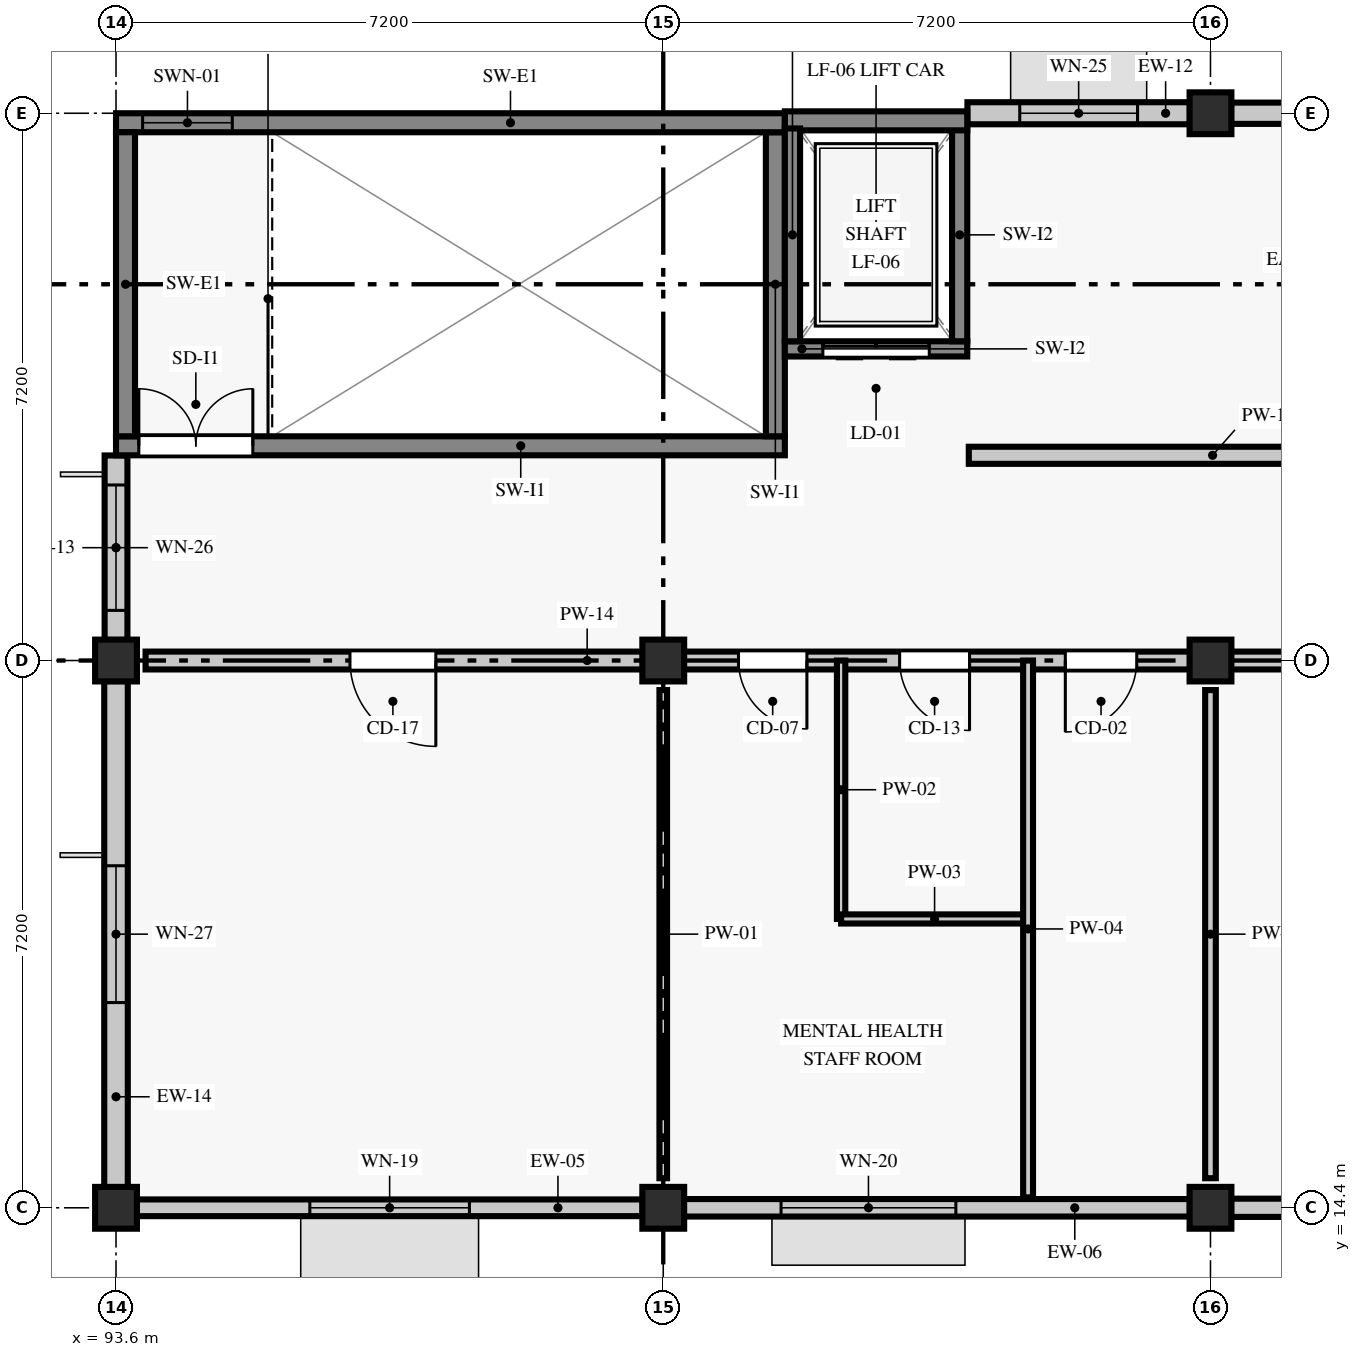
"""IFC4 building model, lengths in metres.
Left out: names, types, materials, properties, quantities, classifications, styles, units other than length and angle.
Written with IfcOpenShell. Run it as: python <this file> out.ifc"""

import sys

from ifc_helpers import new_model, si_unit, direction, frame, frame_2d, origin, origin_2d, place, context, subcontext, project, spatial, rectangle, extrude, element, fill, save


model = new_model("IFC4")
c1 = context("Model", 3, precision=1e-05, world=origin(), true_north=direction((0.0, 1.0)))
c2 = subcontext(c1, "Body", "Model", "MODEL_VIEW")
j1 = project(units=[si_unit("LENGTHUNIT", "METRE"), si_unit("PLANEANGLEUNIT", "RADIAN")], contexts=[c1])
p1 = place(None, origin())
s1 = spatial("IfcSite", under=j1, at=p1, CompositionType="ELEMENT")
p2 = place(p1, origin())
s2 = spatial("IfcBuilding", under=s1, at=p2, CompositionType="ELEMENT")
p3 = place(p2, frame((0.0, 0.0, 18.0)))
s3 = spatial("IfcBuildingStorey", under=s2, at=p3, CompositionType="ELEMENT", Elevation=18.0)
for number, where, z_axis, x_axis in (
    (1, (93.6, 14.4, 0.0), (0.0, 0.0, 1.0), (1.0, 0.0, 0.0)),
    (2, (93.6, 21.6, 0.0), (0.0, 0.0, 1.0), (1.0, 0.0, 0.0)),
    (3, (100.8, 14.4, 0.0), (0.0, 0.0, 1.0), (1.0, 0.0, 0.0)),
    (4, (100.8, 21.6, 0.0), (0.0, 0.0, 1.0), (1.0, 0.0, 0.0)),
    (5, (108.0, 14.4, 0.0), (0.0, 0.0, 1.0), (1.0, 0.0, 0.0)),
    (6, (108.0, 21.6, 0.0), (0.0, 0.0, 1.0), (1.0, 0.0, 0.0)),
    (7, (108.0, 28.8, 0.0), (0.0, 0.0, 1.0), (1.0, 0.0, 0.0)),
):
    element("IfcColumn", number, at=place(p3, frame(where, z_axis=z_axis, x_axis=x_axis)), inside=s3, PredefinedType="COLUMN", context=c2, shape_type="SweptSolid", body=[
        extrude(rectangle(XDim=0.55, YDim=0.55, at=origin_2d()), origin(), (0.0, 0.0, 1.0), 4.2),
    ])
p4 = place(p3, frame((93.871, 14.4, 0.0), z_axis=(0.0, 0.0, 1.0), x_axis=(1.0, 0.0, 0.0)))
e8 = element("IfcWall", 8, at=p4, inside=s3, PredefinedType="STANDARD", context=c2, shape_type="SweptSolid", body=[
    extrude(rectangle(XDim=6.658, YDim=0.22, at=frame_2d((3.329, 0.0))), origin(), (0.0, 0.0, 1.0), 3.55),
])
p5 = place(p4, frame((2.279, 0.0, 0.9)))
e9 = element("IfcOpeningElement", 9, at=p5, cuts=e8, PredefinedType="OPENING", context=c2, shape_type="SweptSolid", body=[
    extrude(rectangle(XDim=2.1, YDim=1.42, at=frame_2d((1.05, 0.71))), frame((0.0, 0.12, 0.0), z_axis=(0.0, -1.0, 0.0), x_axis=(1.0, 0.0, 0.0)), (0.0, 0.0, 1.0), 0.24),
])
p6 = place(p3, frame((101.071, 14.4, 0.0), z_axis=(0.0, 0.0, 1.0), x_axis=(1.0, 0.0, 0.0)))
e10 = element("IfcWall", 10, at=p6, inside=s3, PredefinedType="STANDARD", context=c2, shape_type="SweptSolid", body=[
    extrude(rectangle(XDim=6.658, YDim=0.23, at=frame_2d((3.329, 0.0))), origin(), (0.0, 0.0, 1.0), 3.55),
])
p7 = place(p6, frame((1.279, 0.0, 0.9)))
e11 = element("IfcOpeningElement", 11, at=p7, cuts=e10, PredefinedType="OPENING", context=c2, shape_type="SweptSolid", body=[
    extrude(rectangle(XDim=2.3, YDim=1.42, at=frame_2d((1.15, 0.71))), frame((0.0, 0.125, 0.0), z_axis=(0.0, -1.0, 0.0), x_axis=(1.0, 0.0, 0.0)), (0.0, 0.0, 1.0), 0.25),
])
p8 = place(p3, frame((108.271, 14.4, 0.0), z_axis=(0.0, 0.0, 1.0), x_axis=(1.0, 0.0, 0.0)))
e12 = element("IfcWall", 12, at=p8, inside=s3, PredefinedType="STANDARD", context=c2, shape_type="SweptSolid", body=[
    extrude(rectangle(XDim=6.658, YDim=0.24, at=frame_2d((3.329, 0.0))), origin(), (0.0, 0.0, 1.0), 3.55),
])
p9 = place(p8, frame((2.754, 0.0, 0.9)))
e13 = element("IfcOpeningElement", 13, at=p9, cuts=e12, PredefinedType="OPENING", context=c2, shape_type="SweptSolid", body=[
    extrude(rectangle(XDim=1.15, YDim=1.54, at=frame_2d((0.575, 0.77))), frame((0.0, 0.13, 0.0), z_axis=(0.0, -1.0, 0.0), x_axis=(1.0, 0.0, 0.0)), (0.0, 0.0, 1.0), 0.26),
])
p10 = place(p3, frame((113.598, 28.8, 0.0), z_axis=(0.0, 0.0, 1.0), x_axis=(-1.0, 0.0, 0.0)))
e14 = element("IfcWall", 14, at=p10, inside=s3, PredefinedType="STANDARD", context=c2, shape_type="SweptSolid", body=[
    extrude(rectangle(XDim=5.327, YDim=0.28, at=frame_2d((2.664, 0.0))), origin(), (0.0, 0.0, 1.0), 4.2),
])
p11 = place(p10, frame((1.938, 0.0, 0.9)))
e15 = element("IfcOpeningElement", 15, at=p11, cuts=e14, PredefinedType="OPENING", context=c2, shape_type="SweptSolid", body=[
    extrude(rectangle(XDim=1.45, YDim=1.54, at=frame_2d((0.725, 0.77))), frame((0.0, 0.15, 0.0), z_axis=(0.0, -1.0, 0.0), x_axis=(1.0, 0.0, 0.0)), (0.0, 0.0, 1.0), 0.3),
])
p12 = place(p3, frame((107.729, 28.8, 0.0), z_axis=(0.0, 0.0, 1.0), x_axis=(-1.0, 0.0, 0.0)))
e16 = element("IfcWall", 16, at=p12, inside=s3, PredefinedType="STANDARD", context=c2, shape_type="SweptSolid", body=[
    extrude(rectangle(XDim=2.927, YDim=0.29, at=frame_2d((1.463, 0.0))), origin(), (0.0, 0.0, 1.0), 4.2),
])
p13 = place(p12, frame((0.688, 0.0, 0.9)))
e17 = element("IfcOpeningElement", 17, at=p13, cuts=e16, PredefinedType="OPENING", context=c2, shape_type="SweptSolid", body=[
    extrude(rectangle(XDim=1.55, YDim=1.54, at=frame_2d((0.775, 0.77))), frame((0.0, 0.155, 0.0), z_axis=(0.0, -1.0, 0.0), x_axis=(1.0, 0.0, 0.0)), (0.0, 0.0, 1.0), 0.31),
])
p14 = place(p3, frame((93.6, 24.298, 0.0), z_axis=(0.0, 0.0, 1.0), x_axis=(0.0, -1.0, 0.0)))
e18 = element("IfcWall", 18, at=p14, inside=s3, PredefinedType="STANDARD", context=c2, shape_type="SweptSolid", body=[
    extrude(rectangle(XDim=2.427, YDim=0.3, at=frame_2d((1.213, 0.0))), origin(), (0.0, 0.0, 1.0), 4.2),
])
p15 = place(p14, frame((0.388, 0.0, 0.9)))
e19 = element("IfcOpeningElement", 19, at=p15, cuts=e18, PredefinedType="OPENING", context=c2, shape_type="SweptSolid", body=[
    extrude(rectangle(XDim=1.65, YDim=1.54, at=frame_2d((0.825, 0.77))), frame((0.0, 0.16, 0.0), z_axis=(0.0, -1.0, 0.0), x_axis=(1.0, 0.0, 0.0)), (0.0, 0.0, 1.0), 0.32),
])
p16 = place(p3, frame((93.6, 21.329, 0.0), z_axis=(0.0, 0.0, 1.0), x_axis=(0.0, -1.0, 0.0)))
e20 = element("IfcWall", 20, at=p16, inside=s3, PredefinedType="STANDARD", context=c2, shape_type="SweptSolid", body=[
    extrude(rectangle(XDim=6.658, YDim=0.31, at=frame_2d((3.329, 0.0))), origin(), (0.0, 0.0, 1.0), 3.55),
])
p17 = place(p16, frame((2.429, 0.0, 0.9)))
e21 = element("IfcOpeningElement", 21, at=p17, cuts=e20, PredefinedType="OPENING", context=c2, shape_type="SweptSolid", body=[
    extrude(rectangle(XDim=1.8, YDim=1.54, at=frame_2d((0.9, 0.77))), frame((0.0, 0.165, 0.0), z_axis=(0.0, -1.0, 0.0), x_axis=(1.0, 0.0, 0.0)), (0.0, 0.0, 1.0), 0.33),
])
p18 = place(p3, frame((93.6, 24.425, 0.0), z_axis=(0.0, 0.0, 1.0), x_axis=(1.0, 0.0, 0.0)))
e22 = element("IfcWall", 22, at=p18, inside=s3, PredefinedType="SHEAR", context=c2, shape_type="SweptSolid", body=[
    extrude(rectangle(XDim=8.8, YDim=0.25, at=frame_2d((4.4, 0.0))), origin(), (0.0, 0.0, 1.0), 4.2),
])
p19 = place(p18, frame((0.3, 0.0, 0.0)))
e23 = element("IfcOpeningElement", 23, at=p19, cuts=e22, PredefinedType="OPENING", context=c2, shape_type="SweptSolid", body=[
    extrude(rectangle(XDim=1.5, YDim=2.15, at=frame_2d((0.75, 1.075))), frame((0.0, 0.135, 0.0), z_axis=(0.0, -1.0, 0.0), x_axis=(1.0, 0.0, 0.0)), (0.0, 0.0, 1.0), 0.27),
])
p20 = place(p3, frame((102.275, 24.55, 0.0), z_axis=(0.0, 0.0, 1.0), x_axis=(0.0, 1.0, 0.0)))
e24 = element("IfcWall", 24, at=p20, inside=s3, PredefinedType="SHEAR", context=c2, shape_type="SweptSolid", body=[
    extrude(rectangle(XDim=4.0, YDim=0.25, at=frame_2d((2.0, 0.0))), origin(), (0.0, 0.0, 1.0), 4.2),
])
p21 = place(p3, frame((102.4, 28.675, 0.0), z_axis=(0.0, 0.0, 1.0), x_axis=(-1.0, 0.0, 0.0)))
e25 = element("IfcWall", 25, at=p21, inside=s3, PredefinedType="SHEAR", context=c2, shape_type="SweptSolid", body=[
    extrude(rectangle(XDim=8.8, YDim=0.25, at=frame_2d((4.4, 0.0))), origin(), (0.0, 0.0, 1.0), 4.2),
])
p22 = place(p21, frame((7.27, 0.0, 0.92)))
e26 = element("IfcOpeningElement", 26, at=p22, cuts=e25, PredefinedType="OPENING", context=c2, shape_type="SweptSolid", body=[
    extrude(rectangle(XDim=1.18, YDim=1.48, at=frame_2d((0.59, 0.74))), frame((0.0, 0.135, 0.0), z_axis=(0.0, -1.0, 0.0), x_axis=(1.0, 0.0, 0.0)), (0.0, 0.0, 1.0), 0.27),
])
p23 = place(p3, frame((93.725, 28.55, 0.0), z_axis=(0.0, 0.0, 1.0), x_axis=(0.0, -1.0, 0.0)))
e27 = element("IfcWall", 27, at=p23, inside=s3, PredefinedType="SHEAR", context=c2, shape_type="SweptSolid", body=[
    extrude(rectangle(XDim=4.0, YDim=0.25, at=frame_2d((2.0, 0.0))), origin(), (0.0, 0.0, 1.0), 4.2),
])
p24 = place(p3, frame((102.4, 25.7, 0.0), z_axis=(0.0, 0.0, 1.0), x_axis=(1.0, 0.0, 0.0)))
e28 = element("IfcWall", 28, at=p24, inside=s3, PredefinedType="SHEAR", context=c2, shape_type="SweptSolid", body=[
    extrude(rectangle(XDim=2.4, YDim=0.2, at=frame_2d((1.2, 0.0))), origin(), (0.0, 0.0, 1.0), 4.2),
])
p25 = place(p24, frame((0.5, 0.0, 0.0)))
e29 = element("IfcOpeningElement", 29, at=p25, cuts=e28, PredefinedType="OPENING", context=c2, shape_type="SweptSolid", body=[
    extrude(rectangle(XDim=1.4, YDim=2.15, at=frame_2d((0.7, 1.075))), frame((0.0, 0.11, 0.0), z_axis=(0.0, -1.0, 0.0), x_axis=(1.0, 0.0, 0.0)), (0.0, 0.0, 1.0), 0.22),
])
p26 = place(p3, frame((104.7, 25.8, 0.0), z_axis=(0.0, 0.0, 1.0), x_axis=(0.0, 1.0, 0.0)))
e30 = element("IfcWall", 30, at=p26, inside=s3, PredefinedType="SHEAR", context=c2, shape_type="SweptSolid", body=[
    extrude(rectangle(XDim=2.8, YDim=0.2, at=frame_2d((1.4, 0.0))), origin(), (0.0, 0.0, 1.0), 4.2),
])
p27 = place(p3, frame((104.8, 28.7, 0.0), z_axis=(0.0, 0.0, 1.0), x_axis=(-1.0, 0.0, 0.0)))
e31 = element("IfcWall", 31, at=p27, inside=s3, PredefinedType="SHEAR", context=c2, shape_type="SweptSolid", body=[
    extrude(rectangle(XDim=2.4, YDim=0.25, at=frame_2d((1.2, 0.0))), origin(), (0.0, 0.0, 1.0), 4.2),
])
p28 = place(p3, frame((102.5, 28.6, 0.0), z_axis=(0.0, 0.0, 1.0), x_axis=(0.0, -1.0, 0.0)))
e32 = element("IfcWall", 32, at=p28, inside=s3, PredefinedType="SHEAR", context=c2, shape_type="SweptSolid", body=[
    extrude(rectangle(XDim=2.8, YDim=0.2, at=frame_2d((1.4, 0.0))), origin(), (0.0, 0.0, 1.0), 4.2),
])
p29 = place(p3, frame((93.989, 21.6, 0.0), z_axis=(0.0, 0.0, 1.0), x_axis=(1.0, 0.0, 0.0)))
e33 = element("IfcWall", 33, at=p29, inside=s3, PredefinedType="PARTITIONING", context=c2, shape_type="SweptSolid", body=[
    extrude(rectangle(XDim=20.822, YDim=0.235, at=frame_2d((10.411, 0.0))), origin(), (0.0, 0.0, 1.0), 3.5),
])
p30 = place(p29, frame((2.689, 0.0, 0.0)))
e34 = element("IfcOpeningElement", 34, at=p30, cuts=e33, PredefinedType="OPENING", context=c2, shape_type="SweptSolid", body=[
    extrude(rectangle(XDim=1.13, YDim=2.18, at=frame_2d((0.565, 1.09))), frame((0.0, 0.127, 0.0), z_axis=(0.0, -1.0, 0.0), x_axis=(1.0, 0.0, 0.0)), (0.0, 0.0, 1.0), 0.255),
])
p31 = place(p29, frame((7.801, 0.0, 0.0)))
e35 = element("IfcOpeningElement", 35, at=p31, cuts=e33, PredefinedType="OPENING", context=c2, shape_type="SweptSolid", body=[
    extrude(rectangle(XDim=0.9, YDim=2.13, at=frame_2d((0.45, 1.065))), frame((0.0, 0.127, 0.0), z_axis=(0.0, -1.0, 0.0), x_axis=(1.0, 0.0, 0.0)), (0.0, 0.0, 1.0), 0.255),
])
p32 = place(p29, frame((9.921, 0.0, 0.0)))
e36 = element("IfcOpeningElement", 36, at=p32, cuts=e33, PredefinedType="OPENING", context=c2, shape_type="SweptSolid", body=[
    extrude(rectangle(XDim=0.92, YDim=2.18, at=frame_2d((0.46, 1.09))), frame((0.0, 0.127, 0.0), z_axis=(0.0, -1.0, 0.0), x_axis=(1.0, 0.0, 0.0)), (0.0, 0.0, 1.0), 0.255),
])
p33 = place(p29, frame((12.101, 0.0, 0.0)))
e37 = element("IfcOpeningElement", 37, at=p33, cuts=e33, PredefinedType="OPENING", context=c2, shape_type="SweptSolid", body=[
    extrude(rectangle(XDim=0.94, YDim=2.08, at=frame_2d((0.47, 1.04))), frame((0.0, 0.127, 0.0), z_axis=(0.0, -1.0, 0.0), x_axis=(1.0, 0.0, 0.0)), (0.0, 0.0, 1.0), 0.255),
])
p34 = place(p29, frame((17.009, 0.0, 0.0)))
e38 = element("IfcOpeningElement", 38, at=p34, cuts=e33, PredefinedType="OPENING", context=c2, shape_type="SweptSolid", body=[
    extrude(rectangle(XDim=1.12, YDim=2.23, at=frame_2d((0.56, 1.115))), frame((0.0, 0.127, 0.0), z_axis=(0.0, -1.0, 0.0), x_axis=(1.0, 0.0, 0.0)), (0.0, 0.0, 1.0), 0.255),
])
p35 = place(p3, frame((100.8, 14.789, 0.0), z_axis=(0.0, 0.0, 1.0), x_axis=(0.0, 1.0, 0.0)))
e39 = element("IfcWall", 39, at=p35, inside=s3, PredefinedType="PARTITIONING", context=c2, shape_type="SweptSolid", body=[
    extrude(rectangle(XDim=6.422, YDim=0.1, at=frame_2d((3.211, 0.0))), origin(), (0.0, 0.0, 1.0), 3.65),
])
p36 = place(p3, frame((103.14, 18.2, 0.0), z_axis=(0.0, 0.0, 1.0), x_axis=(0.0, 1.0, 0.0)))
e40 = element("IfcWall", 40, at=p36, inside=s3, PredefinedType="PARTITIONING", context=c2, shape_type="SweptSolid", body=[
    extrude(rectangle(XDim=3.4, YDim=0.11, at=frame_2d((1.7, 0.0))), origin(), (0.0, 0.0, 1.0), 3.5),
])
p37 = place(p3, frame((103.14, 18.2, 0.0), z_axis=(0.0, 0.0, 1.0), x_axis=(1.0, 0.0, 0.0)))
e41 = element("IfcWall", 41, at=p37, inside=s3, PredefinedType="PARTITIONING", context=c2, shape_type="SweptSolid", body=[
    extrude(rectangle(XDim=2.46, YDim=0.12, at=frame_2d((1.23, 0.0))), origin(), (0.0, 0.0, 1.0), 4.2),
])
p38 = place(p3, frame((105.6, 14.537, 0.0), z_axis=(0.0, 0.0, 1.0), x_axis=(0.0, 1.0, 0.0)))
e42 = element("IfcWall", 42, at=p38, inside=s3, PredefinedType="PARTITIONING", context=c2, shape_type="SweptSolid", body=[
    extrude(rectangle(XDim=7.063, YDim=0.13, at=frame_2d((3.531, 0.0))), origin(), (0.0, 0.0, 1.0), 3.5),
])
p39 = place(p3, frame((108.0, 14.789, 0.0), z_axis=(0.0, 0.0, 1.0), x_axis=(0.0, 1.0, 0.0)))
e43 = element("IfcWall", 43, at=p39, inside=s3, PredefinedType="PARTITIONING", context=c2, shape_type="SweptSolid", body=[
    extrude(rectangle(XDim=6.422, YDim=0.14, at=frame_2d((3.211, 0.0))), origin(), (0.0, 0.0, 1.0), 3.65),
])
p40 = place(p3, frame((104.82, 24.3, 0.0), z_axis=(0.0, 0.0, 1.0), x_axis=(1.0, 0.0, 0.0)))
e44 = element("IfcWall", 44, at=p40, inside=s3, PredefinedType="PARTITIONING", context=c2, shape_type="SweptSolid", body=[
    extrude(rectangle(XDim=8.76, YDim=0.225, at=frame_2d((4.38, 0.0))), origin(), (0.0, 0.0, 1.0), 3.65),
])
p41 = place(p40, frame((6.465, 0.0, 0.0)))
e45 = element("IfcOpeningElement", 45, at=p41, cuts=e44, PredefinedType="OPENING", context=c2, shape_type="SweptSolid", body=[
    extrude(rectangle(XDim=1.2, YDim=2.23, at=frame_2d((0.6, 1.115))), frame((0.0, 0.123, 0.0), z_axis=(0.0, -1.0, 0.0), x_axis=(1.0, 0.0, 0.0)), (0.0, 0.0, 1.0), 0.245),
])
p42 = place(p5, origin())
e46 = element("IfcWindow", 46, at=p42, inside=s3, PartitioningType="SINGLE_PANEL", PredefinedType="WINDOW", context=c2, shape_type="SweptSolid", body=[
    extrude(rectangle(XDim=2.1, YDim=1.42, at=frame_2d((1.05, 0.71))), frame((0.0, 0.03, 0.0), z_axis=(0.0, -1.0, 0.0), x_axis=(1.0, 0.0, 0.0)), (0.0, 0.0, 1.0), 0.06),
])
fill(e9, e46)
p43 = place(p7, origin())
e47 = element("IfcWindow", 47, at=p43, inside=s3, PartitioningType="SINGLE_PANEL", PredefinedType="WINDOW", context=c2, shape_type="SweptSolid", body=[
    extrude(rectangle(XDim=2.3, YDim=1.42, at=frame_2d((1.15, 0.71))), frame((0.0, 0.03, 0.0), z_axis=(0.0, -1.0, 0.0), x_axis=(1.0, 0.0, 0.0)), (0.0, 0.0, 1.0), 0.06),
])
fill(e11, e47)
p44 = place(p13, origin())
e48 = element("IfcWindow", 48, at=p44, inside=s3, PartitioningType="SINGLE_PANEL", PredefinedType="WINDOW", context=c2, shape_type="SweptSolid", body=[
    extrude(rectangle(XDim=1.55, YDim=1.54, at=frame_2d((0.775, 0.77))), frame((0.0, 0.03, 0.0), z_axis=(0.0, -1.0, 0.0), x_axis=(1.0, 0.0, 0.0)), (0.0, 0.0, 1.0), 0.06),
])
fill(e17, e48)
p45 = place(p15, origin())
e49 = element("IfcWindow", 49, at=p45, inside=s3, PartitioningType="SINGLE_PANEL", PredefinedType="WINDOW", context=c2, shape_type="SweptSolid", body=[
    extrude(rectangle(XDim=1.65, YDim=1.54, at=frame_2d((0.825, 0.77))), frame((0.0, 0.03, 0.0), z_axis=(0.0, -1.0, 0.0), x_axis=(1.0, 0.0, 0.0)), (0.0, 0.0, 1.0), 0.06),
])
fill(e19, e49)
p46 = place(p17, origin())
e50 = element("IfcWindow", 50, at=p46, inside=s3, PartitioningType="SINGLE_PANEL", PredefinedType="WINDOW", context=c2, shape_type="SweptSolid", body=[
    extrude(rectangle(XDim=1.8, YDim=1.54, at=frame_2d((0.9, 0.77))), frame((0.0, 0.03, 0.0), z_axis=(0.0, -1.0, 0.0), x_axis=(1.0, 0.0, 0.0)), (0.0, 0.0, 1.0), 0.06),
])
fill(e21, e50)
p47 = place(p19, origin())
e51 = element("IfcDoor", 51, at=p47, inside=s3, OperationType="DOUBLE_DOOR_SINGLE_SWING", PredefinedType="DOOR", context=c2, shape_type="SweptSolid", body=[
    extrude(rectangle(XDim=1.5, YDim=2.15, at=frame_2d((0.75, 1.075))), frame((0.0, 0.025, 0.0), z_axis=(0.0, -1.0, 0.0), x_axis=(1.0, 0.0, 0.0)), (0.0, 0.0, 1.0), 0.05),
])
fill(e23, e51)
p48 = place(p22, origin())
e52 = element("IfcWindow", 52, at=p48, inside=s3, PartitioningType="SINGLE_PANEL", PredefinedType="WINDOW", context=c2, shape_type="SweptSolid", body=[
    extrude(rectangle(XDim=1.18, YDim=1.48, at=frame_2d((0.59, 0.74))), frame((0.0, 0.03, 0.0), z_axis=(0.0, -1.0, 0.0), x_axis=(1.0, 0.0, 0.0)), (0.0, 0.0, 1.0), 0.06),
])
fill(e26, e52)
p49 = place(p25, frame((1.4, 0.0, 0.0), z_axis=(0.0, 0.0, 1.0), x_axis=(-1.0, 0.0, 0.0)))
e53 = element("IfcDoor", 53, at=p49, inside=s3, OperationType="DOUBLE_DOOR_SLIDING", PredefinedType="DOOR", context=c2, shape_type="SweptSolid", body=[
    extrude(rectangle(XDim=1.4, YDim=2.15, at=frame_2d((0.7, 1.075))), frame((0.0, 0.025, 0.0), z_axis=(0.0, -1.0, 0.0), x_axis=(1.0, 0.0, 0.0)), (0.0, 0.0, 1.0), 0.05),
])
fill(e29, e53)
p50 = place(p30, frame((1.13, 0.0, 0.0), z_axis=(0.0, 0.0, 1.0), x_axis=(-1.0, 0.0, 0.0)))
e54 = element("IfcDoor", 54, at=p50, inside=s3, OperationType="SINGLE_SWING_LEFT", PredefinedType="DOOR", context=c2, shape_type="SweptSolid", body=[
    extrude(rectangle(XDim=1.13, YDim=2.18, at=frame_2d((0.565, 1.09))), frame((0.0, 0.025, 0.0), z_axis=(0.0, -1.0, 0.0), x_axis=(1.0, 0.0, 0.0)), (0.0, 0.0, 1.0), 0.05),
])
fill(e34, e54)
p51 = place(p31, frame((0.9, 0.0, 0.0), z_axis=(0.0, 0.0, 1.0), x_axis=(-1.0, 0.0, 0.0)))
e55 = element("IfcDoor", 55, at=p51, inside=s3, OperationType="SINGLE_SWING_LEFT", PredefinedType="DOOR", context=c2, shape_type="SweptSolid", body=[
    extrude(rectangle(XDim=0.9, YDim=2.13, at=frame_2d((0.45, 1.065))), frame((0.0, 0.025, 0.0), z_axis=(0.0, -1.0, 0.0), x_axis=(1.0, 0.0, 0.0)), (0.0, 0.0, 1.0), 0.05),
])
fill(e35, e55)
p52 = place(p32, frame((0.92, 0.0, 0.0), z_axis=(0.0, 0.0, 1.0), x_axis=(-1.0, 0.0, 0.0)))
e56 = element("IfcDoor", 56, at=p52, inside=s3, OperationType="SINGLE_SWING_LEFT", PredefinedType="DOOR", context=c2, shape_type="SweptSolid", body=[
    extrude(rectangle(XDim=0.92, YDim=2.18, at=frame_2d((0.46, 1.09))), frame((0.0, 0.025, 0.0), z_axis=(0.0, -1.0, 0.0), x_axis=(1.0, 0.0, 0.0)), (0.0, 0.0, 1.0), 0.05),
])
fill(e36, e56)
p53 = place(p33, frame((0.94, 0.0, 0.0), z_axis=(0.0, 0.0, 1.0), x_axis=(-1.0, 0.0, 0.0)))
e57 = element("IfcDoor", 57, at=p53, inside=s3, OperationType="SINGLE_SWING_RIGHT", PredefinedType="DOOR", context=c2, shape_type="SweptSolid", body=[
    extrude(rectangle(XDim=0.94, YDim=2.08, at=frame_2d((0.47, 1.04))), frame((0.0, 0.025, 0.0), z_axis=(0.0, -1.0, 0.0), x_axis=(1.0, 0.0, 0.0)), (0.0, 0.0, 1.0), 0.05),
])
fill(e37, e57)
save(model, sys.argv[1])
